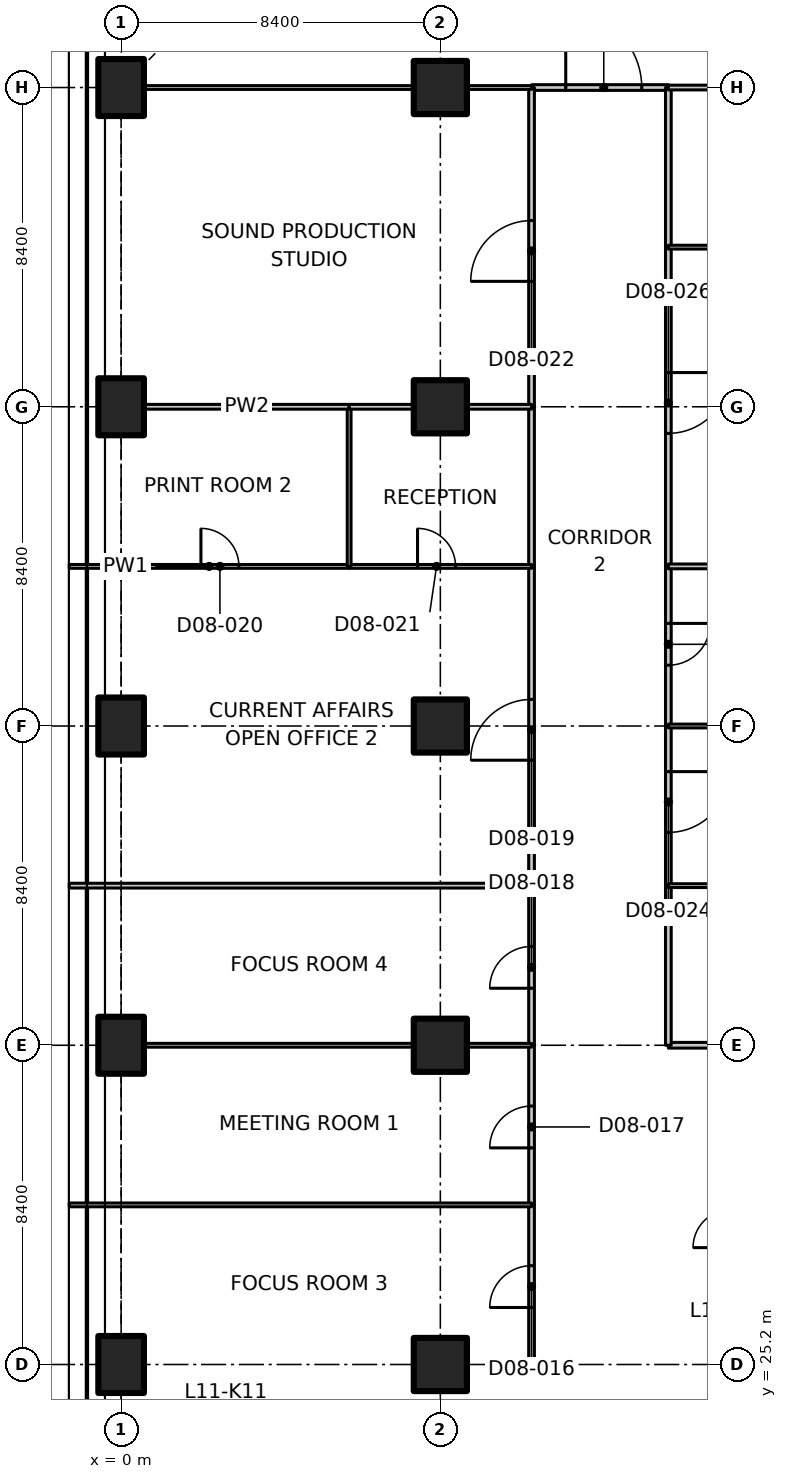
"""IFC4 building model, lengths in metres.
Left out: names, types, materials, properties, quantities, classifications, styles, units other than length and angle.
Written with IfcOpenShell. Run it as: python <this file> out.ifc"""

import sys

from ifc_helpers import new_model, si_unit, direction, frame, frame_2d, origin, origin_2d, place, context, subcontext, project, spatial, polyline, rectangle, outline, extrude, element, fill, save


model = new_model("IFC4")
c1 = context("Model", 3, precision=1e-05, world=origin(), true_north=direction((0.0, 1.0)))
c2 = subcontext(c1, "Body", "Model", "MODEL_VIEW")
j1 = project(units=[si_unit("LENGTHUNIT", "METRE"), si_unit("PLANEANGLEUNIT", "RADIAN")], contexts=[c1])
p1 = place(None, origin())
s1 = spatial("IfcSite", under=j1, at=p1, CompositionType="ELEMENT")
p2 = place(p1, origin())
s2 = spatial("IfcBuilding", under=s1, at=p2, CompositionType="ELEMENT")
p3 = place(p2, frame((0.0, 0.0, 54.5)))
s3 = spatial("IfcBuildingStorey", under=s2, at=p3, CompositionType="ELEMENT", Elevation=54.5)
for number, where, z_axis, x_axis in (
    (1, (0.0, 25.2, 0.0), (0.0, 0.0, 1.0), (1.0, 0.0, 0.0)),
    (2, (0.0, 33.6, 0.0), (0.0, 0.0, 1.0), (1.0, 0.0, 0.0)),
    (3, (0.0, 42.0, 0.0), (0.0, 0.0, 1.0), (1.0, 0.0, 0.0)),
    (4, (0.0, 50.4, 0.0), (0.0, 0.0, 1.0), (1.0, 0.0, 0.0)),
    (5, (0.0, 58.8, 0.0), (0.0, 0.0, 1.0), (1.0, 0.0, 0.0)),
):
    element("IfcColumn", number, at=place(p3, frame(where, z_axis=z_axis, x_axis=x_axis)), inside=s3, PredefinedType="COLUMN", context=c2, shape_type="SweptSolid", body=[
        extrude(rectangle(XDim=1.2, YDim=1.5, at=origin_2d()), origin(), (0.0, 0.0, 1.0), 3.35),
    ])
for number, where, z_axis, x_axis in (
    (6, (8.4, 25.2, 0.0), (0.0, 0.0, 1.0), (1.0, 0.0, 0.0)),
    (7, (8.4, 33.6, 0.0), (0.0, 0.0, 1.0), (1.0, 0.0, 0.0)),
    (8, (8.4, 42.0, 0.0), (0.0, 0.0, 1.0), (1.0, 0.0, 0.0)),
    (9, (8.4, 50.4, 0.0), (0.0, 0.0, 1.0), (1.0, 0.0, 0.0)),
    (10, (8.4, 58.8, 0.0), (0.0, 0.0, 1.0), (1.0, 0.0, 0.0)),
):
    element("IfcColumn", number, at=place(p3, frame(where, z_axis=z_axis, x_axis=x_axis)), inside=s3, PredefinedType="COLUMN", context=c2, shape_type="SweptSolid", body=[
        extrude(rectangle(XDim=1.4, YDim=1.4, at=origin_2d()), origin(), (0.0, 0.0, 1.0), 3.35),
    ])
p4 = place(p3, frame((10.8, 25.2, 0.0), z_axis=(0.0, 0.0, 1.0), x_axis=(0.0, 1.0, 0.0)))
e11 = element("IfcWall", 11, at=p4, inside=s3, PredefinedType="PARTITIONING", context=c2, shape_type="SweptSolid", body=[
    extrude(rectangle(XDim=4.2, YDim=0.15, at=frame_2d((2.1, 0.0))), origin(), (0.0, 0.0, 1.0), 3.33),
])
p5 = place(p4, frame((1.5, 0.0, 0.0)))
e12 = element("IfcOpeningElement", 12, at=p5, cuts=e11, PredefinedType="OPENING", context=c2, shape_type="SweptSolid", body=[
    extrude(rectangle(XDim=1.1, YDim=2.1, at=frame_2d((0.55, 1.05))), frame((0.0, 0.085, 0.0), z_axis=(0.0, -1.0, 0.0), x_axis=(1.0, 0.0, 0.0)), (0.0, 0.0, 1.0), 0.17),
])
p6 = place(p3, frame((10.8, 29.4, 0.0), z_axis=(0.0, 0.0, 1.0), x_axis=(0.0, 1.0, 0.0)))
e13 = element("IfcWall", 13, at=p6, inside=s3, PredefinedType="PARTITIONING", context=c2, shape_type="SweptSolid", body=[
    extrude(rectangle(XDim=4.2, YDim=0.15, at=frame_2d((2.1, 0.0))), origin(), (0.0, 0.0, 1.0), 3.33),
])
p7 = place(p6, frame((1.5, 0.0, 0.0)))
e14 = element("IfcOpeningElement", 14, at=p7, cuts=e13, PredefinedType="OPENING", context=c2, shape_type="SweptSolid", body=[
    extrude(rectangle(XDim=1.1, YDim=2.1, at=frame_2d((0.55, 1.05))), frame((0.0, 0.085, 0.0), z_axis=(0.0, -1.0, 0.0), x_axis=(1.0, 0.0, 0.0)), (0.0, 0.0, 1.0), 0.17),
])
p8 = place(p3, frame((14.4, 33.6, 0.0), z_axis=(0.0, 0.0, 1.0), x_axis=(1.0, 0.0, 0.0)))
e15 = element("IfcWall", 15, at=p8, inside=s3, PredefinedType="PARTITIONING", context=c2, shape_type="SweptSolid", body=[
    extrude(rectangle(XDim=1.5, YDim=0.15, at=frame_2d((0.75, 0.0))), origin(), (0.0, 0.0, 1.0), 3.33),
])
p9 = place(p3, frame((10.8, 58.8, 0.0), z_axis=(0.0, 0.0, 1.0), x_axis=(1.0, 0.0, 0.0)))
e16 = element("IfcWall", 16, at=p9, inside=s3, PredefinedType="PARTITIONING", context=c2, shape_type="SweptSolid", body=[
    extrude(rectangle(XDim=3.6, YDim=0.15, at=frame_2d((1.8, 0.0))), origin(), (0.0, 0.0, 1.0), 3.33),
])
p10 = place(p9, frame((0.9, 0.0, 0.0)))
e17 = element("IfcOpeningElement", 17, at=p10, cuts=e16, PredefinedType="OPENING", context=c2, shape_type="SweptSolid", body=[
    extrude(rectangle(XDim=2.0, YDim=2.4, at=frame_2d((1.0, 1.2))), frame((0.0, 0.085, 0.0), z_axis=(0.0, -1.0, 0.0), x_axis=(1.0, 0.0, 0.0)), (0.0, 0.0, 1.0), 0.17),
])
p11 = place(p3, frame((10.8, 33.6, 0.0), z_axis=(0.0, 0.0, 1.0), x_axis=(0.0, 1.0, 0.0)))
e18 = element("IfcWall", 18, at=p11, inside=s3, PredefinedType="PARTITIONING", context=c2, shape_type="SweptSolid", body=[
    extrude(rectangle(XDim=4.2, YDim=0.15, at=frame_2d((2.1, 0.0))), origin(), (0.0, 0.0, 1.0), 3.33),
])
p12 = place(p11, frame((1.5, 0.0, 0.0)))
e19 = element("IfcOpeningElement", 19, at=p12, cuts=e18, PredefinedType="OPENING", context=c2, shape_type="SweptSolid", body=[
    extrude(rectangle(XDim=1.1, YDim=2.1, at=frame_2d((0.55, 1.05))), frame((0.0, 0.085, 0.0), z_axis=(0.0, -1.0, 0.0), x_axis=(1.0, 0.0, 0.0)), (0.0, 0.0, 1.0), 0.17),
])
p13 = place(p3, frame((10.8, 37.8, 0.0), z_axis=(0.0, 0.0, 1.0), x_axis=(0.0, 1.0, 0.0)))
e20 = element("IfcWall", 20, at=p13, inside=s3, PredefinedType="PARTITIONING", context=c2, shape_type="SweptSolid", body=[
    extrude(rectangle(XDim=8.4, YDim=0.15, at=frame_2d((4.2, 0.0))), origin(), (0.0, 0.0, 1.0), 3.33),
])
p14 = place(p13, frame((3.3, 0.0, 0.0)))
e21 = element("IfcOpeningElement", 21, at=p14, cuts=e20, PredefinedType="OPENING", context=c2, shape_type="SweptSolid", body=[
    extrude(rectangle(XDim=1.6, YDim=2.1, at=frame_2d((0.8, 1.05))), frame((0.0, 0.085, 0.0), z_axis=(0.0, -1.0, 0.0), x_axis=(1.0, 0.0, 0.0)), (0.0, 0.0, 1.0), 0.17),
])
p15 = place(p3, frame((10.8, 46.2, 0.0), z_axis=(0.0, 0.0, 1.0), x_axis=(0.0, 1.0, 0.0)))
e22 = element("IfcWall", 22, at=p15, inside=s3, PredefinedType="PARTITIONING", context=c2, shape_type="SweptSolid", body=[
    extrude(rectangle(XDim=4.2, YDim=0.15, at=frame_2d((2.1, 0.0))), origin(), (0.0, 0.0, 1.0), 3.33),
])
p16 = place(p3, frame((10.8, 50.4, 0.0), z_axis=(0.0, 0.0, 1.0), x_axis=(0.0, 1.0, 0.0)))
e23 = element("IfcWall", 23, at=p16, inside=s3, PredefinedType="PARTITIONING", context=c2, shape_type="SweptSolid", body=[
    extrude(rectangle(XDim=8.4, YDim=0.15, at=frame_2d((4.2, 0.0))), origin(), (0.0, 0.0, 1.0), 3.33),
])
p17 = place(p16, frame((3.3, 0.0, 0.0)))
e24 = element("IfcOpeningElement", 24, at=p17, cuts=e23, PredefinedType="OPENING", context=c2, shape_type="SweptSolid", body=[
    extrude(rectangle(XDim=1.6, YDim=2.1, at=frame_2d((0.8, 1.05))), frame((0.0, 0.085, 0.0), z_axis=(0.0, -1.0, 0.0), x_axis=(1.0, 0.0, 0.0)), (0.0, 0.0, 1.0), 0.17),
])
p18 = place(p3, frame((14.4, 37.8, 0.0), z_axis=(0.0, 0.0, 1.0), x_axis=(0.0, -1.0, 0.0)))
e25 = element("IfcWall", 25, at=p18, inside=s3, PredefinedType="PARTITIONING", context=c2, shape_type="SweptSolid", body=[
    extrude(rectangle(XDim=4.2, YDim=0.15, at=frame_2d((2.1, 0.0))), origin(), (0.0, 0.0, 1.0), 3.33),
])
p19 = place(p3, frame((14.4, 42.0, 0.0), z_axis=(0.0, 0.0, 1.0), x_axis=(0.0, -1.0, 0.0)))
e26 = element("IfcWall", 26, at=p19, inside=s3, PredefinedType="PARTITIONING", context=c2, shape_type="SweptSolid", body=[
    extrude(rectangle(XDim=4.2, YDim=0.15, at=frame_2d((2.1, 0.0))), origin(), (0.0, 0.0, 1.0), 3.33),
])
p20 = place(p19, frame((1.2, 0.0, 0.0)))
e27 = element("IfcOpeningElement", 27, at=p20, cuts=e26, PredefinedType="OPENING", context=c2, shape_type="SweptSolid", body=[
    extrude(rectangle(XDim=1.6, YDim=2.1, at=frame_2d((0.8, 1.05))), frame((0.0, 0.085, 0.0), z_axis=(0.0, -1.0, 0.0), x_axis=(1.0, 0.0, 0.0)), (0.0, 0.0, 1.0), 0.17),
])
p21 = place(p3, frame((14.4, 46.2, 0.0), z_axis=(0.0, 0.0, 1.0), x_axis=(0.0, -1.0, 0.0)))
e28 = element("IfcWall", 28, at=p21, inside=s3, PredefinedType="PARTITIONING", context=c2, shape_type="SweptSolid", body=[
    extrude(rectangle(XDim=4.2, YDim=0.15, at=frame_2d((2.1, 0.0))), origin(), (0.0, 0.0, 1.0), 3.33),
])
p22 = place(p21, frame((1.5, 0.0, 0.0)))
e29 = element("IfcOpeningElement", 29, at=p22, cuts=e28, PredefinedType="OPENING", context=c2, shape_type="SweptSolid", body=[
    extrude(rectangle(XDim=1.1, YDim=2.1, at=frame_2d((0.55, 1.05))), frame((0.0, 0.085, 0.0), z_axis=(0.0, -1.0, 0.0), x_axis=(1.0, 0.0, 0.0)), (0.0, 0.0, 1.0), 0.17),
])
p23 = place(p3, frame((14.4, 54.6, 0.0), z_axis=(0.0, 0.0, 1.0), x_axis=(0.0, -1.0, 0.0)))
e30 = element("IfcWall", 30, at=p23, inside=s3, PredefinedType="PARTITIONING", context=c2, shape_type="SweptSolid", body=[
    extrude(rectangle(XDim=8.4, YDim=0.15, at=frame_2d((4.2, 0.0))), origin(), (0.0, 0.0, 1.0), 3.33),
])
p24 = place(p23, frame((3.3, 0.0, 0.0)))
e31 = element("IfcOpeningElement", 31, at=p24, cuts=e30, PredefinedType="OPENING", context=c2, shape_type="SweptSolid", body=[
    extrude(rectangle(XDim=1.6, YDim=2.1, at=frame_2d((0.8, 1.05))), frame((0.0, 0.085, 0.0), z_axis=(0.0, -1.0, 0.0), x_axis=(1.0, 0.0, 0.0)), (0.0, 0.0, 1.0), 0.17),
])
p25 = place(p3, frame((14.4, 58.8, 0.0), z_axis=(0.0, 0.0, 1.0), x_axis=(0.0, -1.0, 0.0)))
e32 = element("IfcWall", 32, at=p25, inside=s3, PredefinedType="PARTITIONING", context=c2, shape_type="SweptSolid", body=[
    extrude(rectangle(XDim=4.2, YDim=0.15, at=frame_2d((2.1, 0.0))), origin(), (0.0, 0.0, 1.0), 3.33),
])
p26 = place(p3, frame((10.8, 58.8, 0.0), z_axis=(0.0, 0.0, 1.0), x_axis=(-1.0, 0.0, 0.0)))
e33 = element("IfcWall", 33, at=p26, inside=s3, PredefinedType="PARTITIONING", context=c2, shape_type="SweptSolid", body=[
    extrude(rectangle(XDim=1.68, YDim=0.1, at=frame_2d((0.84, 0.0))), origin(), (0.0, 0.0, 1.0), 3.33),
])
p27 = place(p3, frame((7.68, 58.8, 0.0), z_axis=(0.0, 0.0, 1.0), x_axis=(-1.0, 0.0, 0.0)))
e34 = element("IfcWall", 34, at=p27, inside=s3, PredefinedType="PARTITIONING", context=c2, shape_type="SweptSolid", body=[
    extrude(rectangle(XDim=7.06, YDim=0.1, at=frame_2d((3.53, 0.0))), origin(), (0.0, 0.0, 1.0), 3.33),
])
p28 = place(p3, frame((16.08, 58.8, 0.0), z_axis=(0.0, 0.0, 1.0), x_axis=(-1.0, 0.0, 0.0)))
e35 = element("IfcWall", 35, at=p28, inside=s3, PredefinedType="PARTITIONING", context=c2, shape_type="SweptSolid", body=[
    extrude(rectangle(XDim=1.68, YDim=0.125, at=frame_2d((0.84, 0.0))), origin(), (0.0, 0.0, 1.0), 3.33),
])
p29 = place(p3, frame((-1.365, 29.4, 0.0), z_axis=(0.0, 0.0, 1.0), x_axis=(1.0, 0.0, 0.0)))
e36 = element("IfcWall", 36, at=p29, inside=s3, PredefinedType="PARTITIONING", context=c2, shape_type="SweptSolid", body=[
    extrude(outline(polyline([(0.0, 0.0), (12.165, 0.0), (12.165, 3.33), (1.815, 3.33), (1.813, 2.98), (0.917, 2.98), (0.915, 3.33), (0.265, 3.33), (0.0, 3.33), (0.0, 0.0)])), frame((0.0, 0.05, 0.0), z_axis=(0.0, -1.0, 0.0), x_axis=(1.0, 0.0, 0.0)), (0.0, 0.0, 1.0), 0.1),
])
p30 = place(p3, frame((0.62, 33.6, 0.0), z_axis=(0.0, 0.0, 1.0), x_axis=(1.0, 0.0, 0.0)))
e37 = element("IfcWall", 37, at=p30, inside=s3, PredefinedType="PARTITIONING", context=c2, shape_type="SweptSolid", body=[
    extrude(rectangle(XDim=7.06, YDim=0.1, at=frame_2d((3.53, 0.0))), origin(), (0.0, 0.0, 1.0), 3.33),
])
p31 = place(p3, frame((9.12, 33.6, 0.0), z_axis=(0.0, 0.0, 1.0), x_axis=(1.0, 0.0, 0.0)))
e38 = element("IfcWall", 38, at=p31, inside=s3, PredefinedType="PARTITIONING", context=c2, shape_type="SweptSolid", body=[
    extrude(rectangle(XDim=1.68, YDim=0.1, at=frame_2d((0.84, 0.0))), origin(), (0.0, 0.0, 1.0), 3.33),
])
p32 = place(p3, frame((-1.365, 37.8, 0.0), z_axis=(0.0, 0.0, 1.0), x_axis=(1.0, 0.0, 0.0)))
e39 = element("IfcWall", 39, at=p32, inside=s3, PredefinedType="PARTITIONING", context=c2, shape_type="SweptSolid", body=[
    extrude(outline(polyline([(0.0, 0.0), (12.165, 0.0), (12.165, 3.33), (1.815, 3.33), (1.813, 2.98), (0.917, 2.98), (0.915, 3.33), (0.265, 3.33), (0.0, 3.33), (0.0, 0.0)])), frame((0.0, 0.062, 0.0), z_axis=(0.0, -1.0, 0.0), x_axis=(1.0, 0.0, 0.0)), (0.0, 0.0, 1.0), 0.125),
])
p33 = place(p3, frame((-1.365, 46.2, 0.0), z_axis=(0.0, 0.0, 1.0), x_axis=(1.0, 0.0, 0.0)))
e40 = element("IfcWall", 40, at=p33, inside=s3, PredefinedType="PARTITIONING", context=c2, shape_type="SweptSolid", body=[
    extrude(outline(polyline([(0.0, 0.0), (7.365, 0.0), (7.365, 3.33), (1.815, 3.33), (1.813, 2.98), (0.917, 2.98), (0.915, 3.33), (0.265, 3.33), (0.0, 3.33), (0.0, 0.0)])), frame((0.0, 0.05, 0.0), z_axis=(0.0, -1.0, 0.0), x_axis=(1.0, 0.0, 0.0)), (0.0, 0.0, 1.0), 0.1),
])
p34 = place(p33, frame((3.465, 0.0, 0.0)))
e41 = element("IfcOpeningElement", 41, at=p34, cuts=e40, PredefinedType="OPENING", context=c2, shape_type="SweptSolid", body=[
    extrude(rectangle(XDim=1.0, YDim=2.1, at=frame_2d((0.5, 1.05))), frame((0.0, 0.06, 0.0), z_axis=(0.0, -1.0, 0.0), x_axis=(1.0, 0.0, 0.0)), (0.0, 0.0, 1.0), 0.12),
])
p35 = place(p3, frame((6.0, 46.2, 0.0), z_axis=(0.0, 0.0, 1.0), x_axis=(1.0, 0.0, 0.0)))
e42 = element("IfcWall", 42, at=p35, inside=s3, PredefinedType="PARTITIONING", context=c2, shape_type="SweptSolid", body=[
    extrude(rectangle(XDim=4.8, YDim=0.1, at=frame_2d((2.4, 0.0))), origin(), (0.0, 0.0, 1.0), 3.33),
])
p36 = place(p35, frame((1.8, 0.0, 0.0)))
e43 = element("IfcOpeningElement", 43, at=p36, cuts=e42, PredefinedType="OPENING", context=c2, shape_type="SweptSolid", body=[
    extrude(rectangle(XDim=1.0, YDim=2.1, at=frame_2d((0.5, 1.05))), frame((0.0, 0.06, 0.0), z_axis=(0.0, -1.0, 0.0), x_axis=(1.0, 0.0, 0.0)), (0.0, 0.0, 1.0), 0.12),
])
p37 = place(p3, frame((6.0, 50.4, 0.0), z_axis=(0.0, 0.0, 1.0), x_axis=(0.0, -1.0, 0.0)))
e44 = element("IfcWall", 44, at=p37, inside=s3, PredefinedType="PARTITIONING", context=c2, shape_type="SweptSolid", body=[
    extrude(rectangle(XDim=4.2, YDim=0.1, at=frame_2d((2.1, 0.0))), origin(), (0.0, 0.0, 1.0), 3.33),
])
p38 = place(p3, frame((0.62, 50.4, 0.0), z_axis=(0.0, 0.0, 1.0), x_axis=(1.0, 0.0, 0.0)))
e45 = element("IfcWall", 45, at=p38, inside=s3, PredefinedType="PARTITIONING", context=c2, shape_type="SweptSolid", body=[
    extrude(rectangle(XDim=5.38, YDim=0.125, at=frame_2d((2.69, 0.0))), origin(), (0.0, 0.0, 1.0), 3.33),
])
for number, where, z_axis, x_axis in (
    (46, (6.0, 50.4, 0.0), (0.0, 0.0, 1.0), (1.0, 0.0, 0.0)),
    (47, (9.12, 50.4, 0.0), (0.0, 0.0, 1.0), (1.0, 0.0, 0.0)),
):
    element("IfcWall", number, at=place(p3, frame(where, z_axis=z_axis, x_axis=x_axis)), inside=s3, PredefinedType="PARTITIONING", context=c2, shape_type="SweptSolid", body=[
        extrude(rectangle(XDim=1.68, YDim=0.125, at=frame_2d((0.84, 0.0))), origin(), (0.0, 0.0, 1.0), 3.33),
    ])
p39 = place(p3, frame((14.4, 37.8, 0.0), z_axis=(0.0, 0.0, 1.0), x_axis=(1.0, 0.0, 0.0)))
e48 = element("IfcWall", 48, at=p39, inside=s3, PredefinedType="PARTITIONING", context=c2, shape_type="SweptSolid", body=[
    extrude(outline(polyline([(0.0, 0.0), (16.126, 0.0), (16.126, 3.33), (15.843, 3.33), (11.25, 3.33), (11.248, 2.98), (10.352, 2.98), (10.35, 3.33), (0.0, 3.33), (0.0, 0.0)])), frame((0.0, 0.05, 0.0), z_axis=(0.0, -1.0, 0.0), x_axis=(1.0, 0.0, 0.0)), (0.0, 0.0, 1.0), 0.1),
])
p40 = place(p3, frame((14.4, 42.0, 0.0), z_axis=(0.0, 0.0, 1.0), x_axis=(1.0, 0.0, 0.0)))
e49 = element("IfcWall", 49, at=p40, inside=s3, PredefinedType="PARTITIONING", context=c2, shape_type="SweptSolid", body=[
    extrude(rectangle(XDim=1.68, YDim=0.1, at=frame_2d((0.84, 0.0))), origin(), (0.0, 0.0, 1.0), 3.33),
])
p41 = place(p3, frame((14.4, 46.2, 0.0), z_axis=(0.0, 0.0, 1.0), x_axis=(1.0, 0.0, 0.0)))
e50 = element("IfcWall", 50, at=p41, inside=s3, PredefinedType="PARTITIONING", context=c2, shape_type="SweptSolid", body=[
    extrude(outline(polyline([(0.0, 0.0), (12.165, 0.0), (12.165, 3.33), (11.9, 3.33), (11.25, 3.33), (11.248, 2.98), (10.352, 2.98), (10.35, 3.33), (0.0, 3.33), (0.0, 0.0)])), frame((0.0, 0.062, 0.0), z_axis=(0.0, -1.0, 0.0), x_axis=(1.0, 0.0, 0.0)), (0.0, 0.0, 1.0), 0.125),
])
p42 = place(p3, frame((14.4, 54.6, 0.0), z_axis=(0.0, 0.0, 1.0), x_axis=(1.0, 0.0, 0.0)))
e51 = element("IfcWall", 51, at=p42, inside=s3, PredefinedType="PARTITIONING", context=c2, shape_type="SweptSolid", body=[
    extrude(rectangle(XDim=8.4, YDim=0.1, at=frame_2d((4.2, 0.0))), origin(), (0.0, 0.0, 1.0), 3.33),
])
p43 = place(p42, frame((3.6, 0.0, 0.0)))
e52 = element("IfcOpeningElement", 52, at=p43, cuts=e51, PredefinedType="OPENING", context=c2, shape_type="SweptSolid", body=[
    extrude(rectangle(XDim=1.0, YDim=2.1, at=frame_2d((0.5, 1.05))), frame((0.0, 0.06, 0.0), z_axis=(0.0, -1.0, 0.0), x_axis=(1.0, 0.0, 0.0)), (0.0, 0.0, 1.0), 0.12),
])
p44 = place(p10, origin())
e53 = element("IfcDoor", 53, at=p44, inside=s3, OperationType="DOUBLE_DOOR_SINGLE_SWING", PredefinedType="DOOR", context=c2, shape_type="SweptSolid", body=[
    extrude(rectangle(XDim=2.0, YDim=2.4, at=frame_2d((1.0, 1.2))), frame((0.0, 0.025, 0.0), z_axis=(0.0, -1.0, 0.0), x_axis=(1.0, 0.0, 0.0)), (0.0, 0.0, 1.0), 0.05),
])
fill(e17, e53)
p45 = place(p5, origin())
e54 = element("IfcDoor", 54, at=p45, inside=s3, OperationType="SINGLE_SWING_LEFT", PredefinedType="DOOR", context=c2, shape_type="SweptSolid", body=[
    extrude(rectangle(XDim=1.1, YDim=2.1, at=frame_2d((0.55, 1.05))), frame((0.0, 0.025, 0.0), z_axis=(0.0, -1.0, 0.0), x_axis=(1.0, 0.0, 0.0)), (0.0, 0.0, 1.0), 0.05),
])
fill(e12, e54)
p46 = place(p7, origin())
e55 = element("IfcDoor", 55, at=p46, inside=s3, OperationType="SINGLE_SWING_LEFT", PredefinedType="DOOR", context=c2, shape_type="SweptSolid", body=[
    extrude(rectangle(XDim=1.1, YDim=2.1, at=frame_2d((0.55, 1.05))), frame((0.0, 0.025, 0.0), z_axis=(0.0, -1.0, 0.0), x_axis=(1.0, 0.0, 0.0)), (0.0, 0.0, 1.0), 0.05),
])
fill(e14, e55)
p47 = place(p12, origin())
e56 = element("IfcDoor", 56, at=p47, inside=s3, OperationType="SINGLE_SWING_LEFT", PredefinedType="DOOR", context=c2, shape_type="SweptSolid", body=[
    extrude(rectangle(XDim=1.1, YDim=2.1, at=frame_2d((0.55, 1.05))), frame((0.0, 0.025, 0.0), z_axis=(0.0, -1.0, 0.0), x_axis=(1.0, 0.0, 0.0)), (0.0, 0.0, 1.0), 0.05),
])
fill(e19, e56)
p48 = place(p14, origin())
e57 = element("IfcDoor", 57, at=p48, inside=s3, OperationType="DOUBLE_DOOR_SINGLE_SWING", PredefinedType="DOOR", context=c2, shape_type="SweptSolid", body=[
    extrude(rectangle(XDim=1.6, YDim=2.1, at=frame_2d((0.8, 1.05))), frame((0.0, 0.025, 0.0), z_axis=(0.0, -1.0, 0.0), x_axis=(1.0, 0.0, 0.0)), (0.0, 0.0, 1.0), 0.05),
])
fill(e21, e57)
p49 = place(p34, origin())
e58 = element("IfcDoor", 58, at=p49, inside=s3, OperationType="SINGLE_SWING_LEFT", PredefinedType="DOOR", context=c2, shape_type="SweptSolid", body=[
    extrude(rectangle(XDim=1.0, YDim=2.1, at=frame_2d((0.5, 1.05))), frame((0.0, 0.025, 0.0), z_axis=(0.0, -1.0, 0.0), x_axis=(1.0, 0.0, 0.0)), (0.0, 0.0, 1.0), 0.05),
])
fill(e41, e58)
p50 = place(p36, origin())
e59 = element("IfcDoor", 59, at=p50, inside=s3, OperationType="SINGLE_SWING_LEFT", PredefinedType="DOOR", context=c2, shape_type="SweptSolid", body=[
    extrude(rectangle(XDim=1.0, YDim=2.1, at=frame_2d((0.5, 1.05))), frame((0.0, 0.025, 0.0), z_axis=(0.0, -1.0, 0.0), x_axis=(1.0, 0.0, 0.0)), (0.0, 0.0, 1.0), 0.05),
])
fill(e43, e59)
p51 = place(p17, origin())
e60 = element("IfcDoor", 60, at=p51, inside=s3, OperationType="DOUBLE_DOOR_SINGLE_SWING", PredefinedType="DOOR", context=c2, shape_type="SweptSolid", body=[
    extrude(rectangle(XDim=1.6, YDim=2.1, at=frame_2d((0.8, 1.05))), frame((0.0, 0.025, 0.0), z_axis=(0.0, -1.0, 0.0), x_axis=(1.0, 0.0, 0.0)), (0.0, 0.0, 1.0), 0.05),
])
fill(e24, e60)
p52 = place(p20, origin())
e61 = element("IfcDoor", 61, at=p52, inside=s3, OperationType="DOUBLE_DOOR_SINGLE_SWING", PredefinedType="DOOR", context=c2, shape_type="SweptSolid", body=[
    extrude(rectangle(XDim=1.6, YDim=2.1, at=frame_2d((0.8, 1.05))), frame((0.0, 0.025, 0.0), z_axis=(0.0, -1.0, 0.0), x_axis=(1.0, 0.0, 0.0)), (0.0, 0.0, 1.0), 0.05),
])
fill(e27, e61)
p53 = place(p22, origin())
e62 = element("IfcDoor", 62, at=p53, inside=s3, OperationType="SINGLE_SWING_LEFT", PredefinedType="DOOR", context=c2, shape_type="SweptSolid", body=[
    extrude(rectangle(XDim=1.1, YDim=2.1, at=frame_2d((0.55, 1.05))), frame((0.0, 0.025, 0.0), z_axis=(0.0, -1.0, 0.0), x_axis=(1.0, 0.0, 0.0)), (0.0, 0.0, 1.0), 0.05),
])
fill(e29, e62)
p54 = place(p24, origin())
e63 = element("IfcDoor", 63, at=p54, inside=s3, OperationType="DOUBLE_DOOR_SINGLE_SWING", PredefinedType="DOOR", context=c2, shape_type="SweptSolid", body=[
    extrude(rectangle(XDim=1.6, YDim=2.1, at=frame_2d((0.8, 1.05))), frame((0.0, 0.025, 0.0), z_axis=(0.0, -1.0, 0.0), x_axis=(1.0, 0.0, 0.0)), (0.0, 0.0, 1.0), 0.05),
])
fill(e31, e63)
save(model, sys.argv[1])
